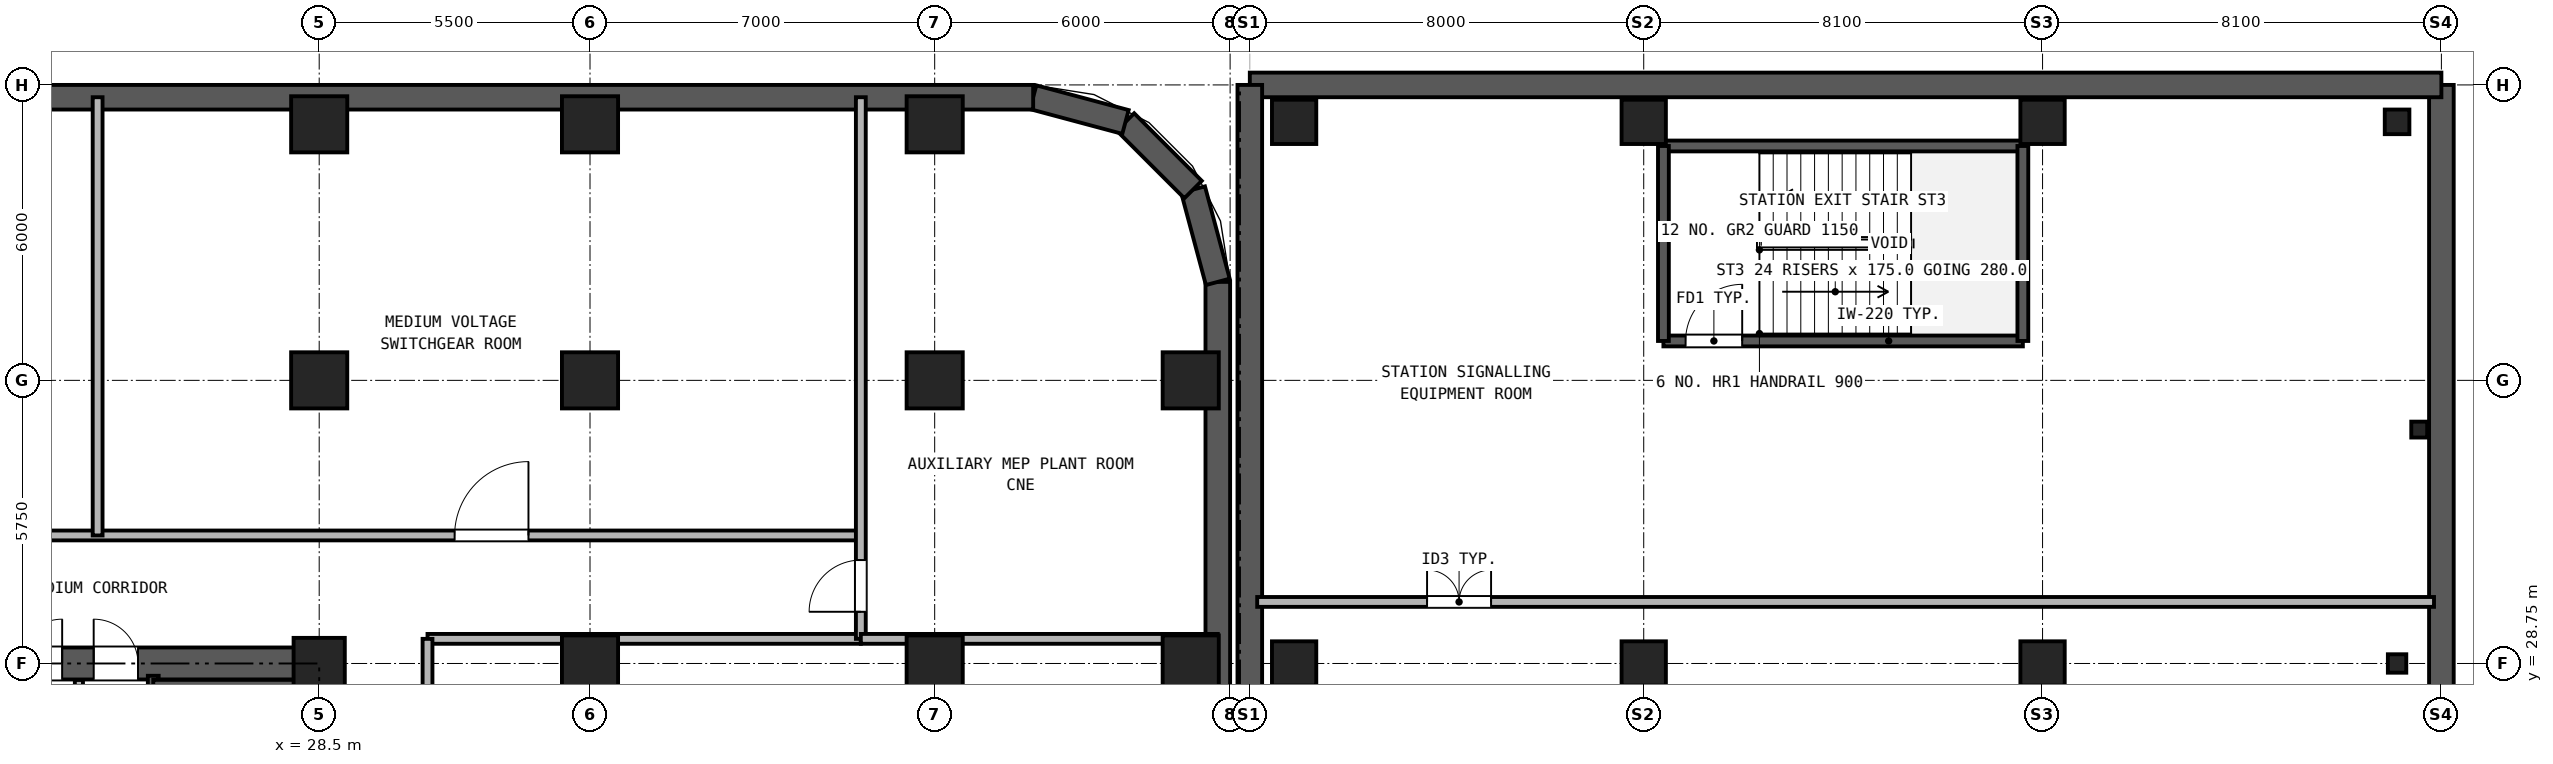
"""IFC4 building model, lengths in metres.
Left out: names, types, materials, properties, quantities, classifications, styles, units other than length and angle.
Written with IfcOpenShell. Run it as: python <this file> out.ifc"""

import sys

from ifc_helpers import new_model, si_unit, direction, frame, frame_2d, origin, origin_2d, place, context, subcontext, project, spatial, rectangle, hollow_rectangle, i_section, extrude, source, transform, mapped, element, fill, save


model = new_model("IFC4")
c1 = context("Model", 3, precision=1e-05, world=origin(), true_north=direction((0.0, 1.0)))
c2 = subcontext(c1, "Body", "Model", "MODEL_VIEW")
j1 = project(units=[si_unit("LENGTHUNIT", "METRE"), si_unit("PLANEANGLEUNIT", "RADIAN")], contexts=[c1])
p1 = place(None, origin())
s1 = spatial("IfcSite", under=j1, at=p1, CompositionType="ELEMENT")
p2 = place(p1, origin())
s2 = spatial("IfcBuilding", under=s1, at=p2, CompositionType="ELEMENT")
p3 = place(p2, frame((0.0, 0.0, -4.2)))
s3 = spatial("IfcBuildingStorey", under=s2, at=p3, CompositionType="ELEMENT", Elevation=-4.2)
m1 = source(origin(), c2, "Body", "SweptSolid", [
    extrude(hollow_rectangle(XDim=1.14, YDim=1.14, WallThickness=0.07, at=origin_2d()), origin(), (0.0, 0.0, 1.0), 3.88),
])
for number, where, z_axis, x_axis in (
    (1, (28.5, 39.7, 0.0), (0.0, 0.0, 1.0), (1.0, 0.0, 0.0)),
    (2, (34.0, 39.7, 0.0), (0.0, 0.0, 1.0), (1.0, 0.0, 0.0)),
    (3, (41.0, 39.7, 0.0), (0.0, 0.0, 1.0), (1.0, 0.0, 0.0)),
    (4, (46.2, 28.75, 0.0), (0.0, 0.0, 1.0), (1.0, 0.0, 0.0)),
    (5, (46.2, 34.5, 0.0), (0.0, 0.0, 1.0), (1.0, 0.0, 0.0)),
):
    element("IfcColumn", number, at=place(p3, frame(where, z_axis=z_axis, x_axis=x_axis)), inside=s3, PredefinedType="COLUMN", context=c2, shape_type="MappedRepresentation", body=[
        mapped(m1, transform((0.0, 0.0, 0.0), x_axis=(1.0, 0.0, 0.0), y_axis=(0.0, 1.0, 0.0), z_axis=(0.0, 0.0, 1.0), scale=1.0)),
    ])
m2 = source(origin(), c2, "Body", "SweptSolid", [
    extrude(hollow_rectangle(XDim=1.04, YDim=1.04, WallThickness=0.065, at=origin_2d()), origin(), (0.0, 0.0, 1.0), 3.88),
])
p4 = place(p3, frame((28.5, 28.75, 0.0), z_axis=(0.0, 0.0, 1.0), x_axis=(1.0, 0.0, 0.0)))
e6 = element("IfcColumn", 6, at=p4, inside=s3, PredefinedType="COLUMN", context=c2, shape_type="MappedRepresentation", body=[
    mapped(m2, transform((0.0, 0.0, 0.0), x_axis=(1.0, 0.0, 0.0), y_axis=(0.0, 1.0, 0.0), z_axis=(0.0, 0.0, 1.0), scale=1.0)),
])
for number, where, z_axis, x_axis in (
    (7, (28.5, 34.5, 0.0), (0.0, 0.0, 1.0), (1.0, 0.0, 0.0)),
    (8, (34.0, 28.75, 0.0), (0.0, 0.0, 1.0), (1.0, 0.0, 0.0)),
    (9, (34.0, 34.5, 0.0), (0.0, 0.0, 1.0), (1.0, 0.0, 0.0)),
    (10, (41.0, 28.75, 0.0), (0.0, 0.0, 1.0), (1.0, 0.0, 0.0)),
    (11, (41.0, 34.5, 0.0), (0.0, 0.0, 1.0), (1.0, 0.0, 0.0)),
):
    element("IfcColumn", number, at=place(p3, frame(where, z_axis=z_axis, x_axis=x_axis)), inside=s3, PredefinedType="COLUMN", context=c2, shape_type="MappedRepresentation", body=[
        mapped(m1, transform((0.0, 0.0, 0.0), x_axis=(1.0, 0.0, 0.0), y_axis=(0.0, 1.0, 0.0), z_axis=(0.0, 0.0, 1.0), scale=1.0)),
    ])
m3 = source(origin(), c2, "Body", "SweptSolid", [
    extrude(hollow_rectangle(XDim=0.7, YDim=0.9, WallThickness=0.04, at=origin_2d()), origin(), (0.0, 0.0, 1.0), 3.88),
])
for number, where, z_axis, x_axis in (
    (12, (48.3, 28.75, 0.0), (0.0, 0.0, 1.0), (1.0, 0.0, 0.0)),
    (13, (48.3, 39.75, 0.0), (0.0, 0.0, 1.0), (1.0, 0.0, 0.0)),
    (14, (55.4, 28.75, 0.0), (0.0, 0.0, 1.0), (1.0, 0.0, 0.0)),
    (15, (55.4, 39.75, 0.0), (0.0, 0.0, 1.0), (1.0, 0.0, 0.0)),
    (16, (63.5, 28.75, 0.0), (0.0, 0.0, 1.0), (1.0, 0.0, 0.0)),
    (17, (63.5, 39.75, 0.0), (0.0, 0.0, 1.0), (1.0, 0.0, 0.0)),
):
    element("IfcColumn", number, at=place(p3, frame(where, z_axis=z_axis, x_axis=x_axis)), inside=s3, PredefinedType="COLUMN", context=c2, shape_type="MappedRepresentation", body=[
        mapped(m3, transform((0.0, 0.0, 0.0), x_axis=(1.0, 0.0, 0.0), y_axis=(0.0, 1.0, 0.0), z_axis=(0.0, 0.0, 1.0), scale=1.0)),
    ])
m4 = source(origin(), c2, "Body", "SweptSolid", [
    extrude(i_section(OverallWidth=0.374, OverallDepth=0.372, WebThickness=0.016, FlangeThickness=0.026, at=origin_2d()), origin(), (0.0, 0.0, 1.0), 3.88),
])
p5 = place(p3, frame((70.7, 28.75, 0.0), z_axis=(0.0, 0.0, 1.0), x_axis=(1.0, 0.0, 0.0)))
e18 = element("IfcColumn", 18, at=p5, inside=s3, PredefinedType="COLUMN", context=c2, shape_type="MappedRepresentation", body=[
    mapped(m4, transform((0.0, 0.0, 0.0), x_axis=(1.0, 0.0, 0.0), y_axis=(0.0, 1.0, 0.0), z_axis=(0.0, 0.0, 1.0), scale=1.0)),
])
m5 = source(origin(), c2, "Body", "SweptSolid", [
    extrude(hollow_rectangle(XDim=0.5, YDim=0.5, WallThickness=0.025, at=origin_2d()), origin(), (0.0, 0.0, 1.0), 3.88),
])
p6 = place(p3, frame((70.7, 39.75, 0.0), z_axis=(0.0, 0.0, 1.0), x_axis=(1.0, 0.0, 0.0)))
e19 = element("IfcColumn", 19, at=p6, inside=s3, PredefinedType="COLUMN", context=c2, shape_type="MappedRepresentation", body=[
    mapped(m5, transform((0.0, 0.0, 0.0), x_axis=(1.0, 0.0, 0.0), y_axis=(0.0, 1.0, 0.0), z_axis=(0.0, 0.0, 1.0), scale=1.0)),
])
m6 = source(origin(), c2, "Body", "SweptSolid", [
    extrude(i_section(OverallWidth=0.309, OverallDepth=0.323, WebThickness=0.014, FlangeThickness=0.023, at=origin_2d()), origin(), (0.0, 0.0, 1.0), 3.88),
])
p7 = place(p3, frame((71.15, 33.5, 0.0), z_axis=(0.0, 0.0, 1.0), x_axis=(1.0, 0.0, 0.0)))
e20 = element("IfcColumn", 20, at=p7, inside=s3, PredefinedType="PILASTER", context=c2, shape_type="MappedRepresentation", body=[
    mapped(m6, transform((0.0, 0.0, 0.0), x_axis=(1.0, 0.0, 0.0), y_axis=(0.0, 1.0, 0.0), z_axis=(0.0, 0.0, 1.0), scale=1.0)),
])
p8 = place(p3, frame((46.75, 4.0, 0.0), z_axis=(0.0, 0.0, 1.0), x_axis=(0.0, 1.0, 0.0)))
e21 = element("IfcWall", 21, at=p8, inside=s3, PredefinedType="USERDEFINED", context=c2, shape_type="SweptSolid", body=[
    extrude(rectangle(XDim=32.5, YDim=0.5, at=frame_2d((16.25, 0.0))), origin(), (0.0, 0.0, 1.0), 3.88),
])
for number, where, z_axis, x_axis in (
    (22, (46.75, 36.5, 0.0), (0.0, 0.0, 1.0), (-0.259, 0.966, 0.0)),
    (23, (46.248, 38.375, 0.0), (0.0, 0.0, 1.0), (-0.707, 0.707, 0.0)),
    (24, (44.875, 39.748, 0.0), (0.0, 0.0, 1.0), (-0.966, 0.259, 0.0)),
):
    element("IfcWall", number, at=place(p3, frame(where, z_axis=z_axis, x_axis=x_axis)), inside=s3, PredefinedType="USERDEFINED", context=c2, shape_type="SweptSolid", body=[
        extrude(rectangle(XDim=1.941, YDim=0.5, at=frame_2d((0.971, 0.0))), origin(), (0.0, 0.0, 1.0), 3.88),
    ])
p9 = place(p3, frame((43.0, 40.25, 0.0), z_axis=(0.0, 0.0, 1.0), x_axis=(-1.0, 0.0, 0.0)))
e25 = element("IfcWall", 25, at=p9, inside=s3, PredefinedType="USERDEFINED", context=c2, shape_type="SweptSolid", body=[
    extrude(rectangle(XDim=39.0, YDim=0.5, at=frame_2d((19.5, 0.0))), origin(), (0.0, 0.0, 1.0), 3.88),
])
p10 = place(p3, frame((71.6, -11.1, 0.0), z_axis=(0.0, 0.0, 1.0), x_axis=(0.0, 1.0, 0.0)))
e26 = element("IfcWall", 26, at=p10, inside=s3, PredefinedType="USERDEFINED", context=c2, shape_type="SweptSolid", body=[
    extrude(rectangle(XDim=51.6, YDim=0.5, at=frame_2d((25.8, 0.0))), origin(), (0.0, 0.0, 1.0), 3.88),
])
p11 = place(p3, frame((71.6, 40.5, 0.0), z_axis=(0.0, 0.0, 1.0), x_axis=(-1.0, 0.0, 0.0)))
e27 = element("IfcWall", 27, at=p11, inside=s3, PredefinedType="USERDEFINED", context=c2, shape_type="SweptSolid", body=[
    extrude(rectangle(XDim=24.2, YDim=0.5, at=frame_2d((12.1, 0.0))), origin(), (0.0, 0.0, 1.0), 3.88),
])
p12 = place(p3, frame((47.4, 40.5, 0.0), z_axis=(0.0, 0.0, 1.0), x_axis=(0.0, -1.0, 0.0)))
e28 = element("IfcWall", 28, at=p12, inside=s3, PredefinedType="USERDEFINED", context=c2, shape_type="SweptSolid", body=[
    extrude(rectangle(XDim=40.9, YDim=0.5, at=frame_2d((20.45, 0.0))), origin(), (0.0, 0.0, 1.0), 3.88),
])
p13 = place(p3, frame((18.175, 28.75, 0.0), z_axis=(0.0, 0.0, 1.0), x_axis=(1.0, 0.0, 0.0)))
e29 = element("IfcWall", 29, at=p13, inside=s3, PredefinedType="SHEAR", context=c2, shape_type="SweptSolid", body=[
    extrude(rectangle(XDim=10.65, YDim=0.65, at=frame_2d((5.325, 0.0))), origin(), (0.0, 0.0, 1.0), 3.88),
])
p14 = place(p13, frame((4.205, 0.0, 0.0)))
e30 = element("IfcOpeningElement", 30, at=p14, cuts=e29, PredefinedType="OPENING", context=c2, shape_type="SweptSolid", body=[
    extrude(rectangle(XDim=0.9, YDim=2.05, at=frame_2d((0.45, 1.025))), frame((0.0, 0.335, 0.0), z_axis=(0.0, -1.0, 0.0), x_axis=(1.0, 0.0, 0.0)), (0.0, 0.0, 1.0), 0.67),
])
p15 = place(p13, frame((5.745, 0.0, 0.0)))
e31 = element("IfcOpeningElement", 31, at=p15, cuts=e29, PredefinedType="OPENING", context=c2, shape_type="SweptSolid", body=[
    extrude(rectangle(XDim=0.9, YDim=2.05, at=frame_2d((0.45, 1.025))), frame((0.0, 0.335, 0.0), z_axis=(0.0, -1.0, 0.0), x_axis=(1.0, 0.0, 0.0)), (0.0, 0.0, 1.0), 0.67),
])
p16 = place(p3, frame((28.5, 11.825, 0.0), z_axis=(0.0, 0.0, 1.0), x_axis=(0.0, 1.0, 0.0)))
e32 = element("IfcWall", 32, at=p16, inside=s3, PredefinedType="SHEAR", context=c2, shape_type="SweptSolid", body=[
    extrude(rectangle(XDim=16.6, YDim=0.65, at=frame_2d((8.3, 0.0))), origin(), (0.0, 0.0, 1.0), 3.88),
])
p17 = place(p16, frame((7.325, 0.0, 0.0)))
e33 = element("IfcOpeningElement", 33, at=p17, cuts=e32, PredefinedType="OPENING", context=c2, shape_type="SweptSolid", body=[
    extrude(rectangle(XDim=1.15, YDim=2.2, at=frame_2d((0.575, 1.1))), frame((0.0, 0.335, 0.0), z_axis=(0.0, -1.0, 0.0), x_axis=(1.0, 0.0, 0.0)), (0.0, 0.0, 1.0), 0.67),
])
p18 = place(p3, frame((25.13, 21.39, 0.0), z_axis=(0.0, 0.0, 1.0), x_axis=(0.0, 1.0, 0.0)))
e34 = element("IfcWall", 34, at=p18, inside=s3, PredefinedType="SOLIDWALL", context=c2, shape_type="SweptSolid", body=[
    extrude(rectangle(XDim=7.11, YDim=0.22, at=frame_2d((3.555, 0.0))), origin(), (0.0, 0.0, 1.0), 3.88),
])
p19 = place(p3, frame((25.13, 28.335, 0.0), z_axis=(0.0, 0.0, 1.0), x_axis=(1.0, 0.0, 0.0)))
e35 = element("IfcWall", 35, at=p19, inside=s3, PredefinedType="PARTITIONING", context=c2, shape_type="SweptSolid", body=[
    extrude(rectangle(XDim=3.035, YDim=0.165, at=frame_2d((1.518, 0.0))), origin(), (0.0, 0.0, 1.0), 3.88),
])
p20 = place(p3, frame((23.62, 24.4, 0.0), z_axis=(0.0, 0.0, 1.0), x_axis=(0.0, 1.0, 0.0)))
e36 = element("IfcWall", 36, at=p20, inside=s3, PredefinedType="PARTITIONING", context=c2, shape_type="SweptSolid", body=[
    extrude(rectangle(XDim=4.015, YDim=0.165, at=frame_2d((2.008, 0.0))), origin(), (0.0, 0.0, 1.0), 3.88),
])
p21 = place(p3, frame((7.5, 31.35, 0.0), z_axis=(0.0, 0.0, 1.0), x_axis=(1.0, 0.0, 0.0)))
e37 = element("IfcWall", 37, at=p21, inside=s3, PredefinedType="PARTITIONING", context=c2, shape_type="SweptSolid", body=[
    extrude(rectangle(XDim=32.0, YDim=0.2, at=frame_2d((16.0, 0.0))), origin(), (0.0, 0.0, 1.0), 3.88),
])
p22 = place(p21, frame((7.75, 0.0, 0.0)))
e38 = element("IfcOpeningElement", 38, at=p22, cuts=e37, PredefinedType="OPENING", context=c2, shape_type="SweptSolid", body=[
    extrude(rectangle(XDim=1.5, YDim=2.25, at=frame_2d((0.75, 1.125))), frame((0.0, 0.11, 0.0), z_axis=(0.0, -1.0, 0.0), x_axis=(1.0, 0.0, 0.0)), (0.0, 0.0, 1.0), 0.22),
])
p23 = place(p21, frame((23.75, 0.0, 0.0)))
e39 = element("IfcOpeningElement", 39, at=p23, cuts=e37, PredefinedType="OPENING", context=c2, shape_type="SweptSolid", body=[
    extrude(rectangle(XDim=1.5, YDim=2.25, at=frame_2d((0.75, 1.125))), frame((0.0, 0.11, 0.0), z_axis=(0.0, -1.0, 0.0), x_axis=(1.0, 0.0, 0.0)), (0.0, 0.0, 1.0), 0.22),
])
p24 = place(p3, frame((30.7, 29.25, 0.0), z_axis=(0.0, 0.0, 1.0), x_axis=(1.0, 0.0, 0.0)))
e40 = element("IfcWall", 40, at=p24, inside=s3, PredefinedType="PARTITIONING", context=c2, shape_type="SweptSolid", body=[
    extrude(rectangle(XDim=8.8, YDim=0.2, at=frame_2d((4.4, 0.0))), origin(), (0.0, 0.0, 1.0), 3.88),
])
p25 = place(p3, frame((30.7, 11.0, 0.0), z_axis=(0.0, 0.0, 1.0), x_axis=(0.0, 1.0, 0.0)))
e41 = element("IfcWall", 41, at=p25, inside=s3, PredefinedType="PARTITIONING", context=c2, shape_type="SweptSolid", body=[
    extrude(rectangle(XDim=18.25, YDim=0.2, at=frame_2d((9.125, 0.0))), origin(), (0.0, 0.0, 1.0), 3.88),
])
p26 = place(p25, frame((8.625, 0.0, 0.0)))
e42 = element("IfcOpeningElement", 42, at=p26, cuts=e41, PredefinedType="OPENING", context=c2, shape_type="SweptSolid", body=[
    extrude(rectangle(XDim=0.95, YDim=2.15, at=frame_2d((0.475, 1.075))), frame((0.0, 0.11, 0.0), z_axis=(0.0, -1.0, 0.0), x_axis=(1.0, 0.0, 0.0)), (0.0, 0.0, 1.0), 0.22),
])
p27 = place(p3, frame((39.5, 29.25, 0.0), z_axis=(0.0, 0.0, 1.0), x_axis=(0.0, 1.0, 0.0)))
e43 = element("IfcWall", 43, at=p27, inside=s3, PredefinedType="PARTITIONING", context=c2, shape_type="SweptSolid", body=[
    extrude(rectangle(XDim=11.0, YDim=0.2, at=frame_2d((5.5, 0.0))), origin(), (0.0, 0.0, 1.0), 3.88),
])
p28 = place(p27, frame((0.55, 0.0, 0.0)))
e44 = element("IfcOpeningElement", 44, at=p28, cuts=e43, PredefinedType="OPENING", context=c2, shape_type="SweptSolid", body=[
    extrude(rectangle(XDim=1.05, YDim=2.15, at=frame_2d((0.525, 1.075))), frame((0.0, 0.11, 0.0), z_axis=(0.0, -1.0, 0.0), x_axis=(1.0, 0.0, 0.0)), (0.0, 0.0, 1.0), 0.22),
])
p29 = place(p3, frame((39.5, 29.25, 0.0), z_axis=(0.0, 0.0, 1.0), x_axis=(1.0, 0.0, 0.0)))
e45 = element("IfcWall", 45, at=p29, inside=s3, PredefinedType="PARTITIONING", context=c2, shape_type="SweptSolid", body=[
    extrude(rectangle(XDim=7.25, YDim=0.2, at=frame_2d((3.625, 0.0))), origin(), (0.0, 0.0, 1.0), 3.88),
])
p30 = place(p3, frame((24.0, 31.35, 0.0), z_axis=(0.0, 0.0, 1.0), x_axis=(0.0, 1.0, 0.0)))
e46 = element("IfcWall", 46, at=p30, inside=s3, PredefinedType="PARTITIONING", context=c2, shape_type="SweptSolid", body=[
    extrude(rectangle(XDim=8.9, YDim=0.2, at=frame_2d((4.45, 0.0))), origin(), (0.0, 0.0, 1.0), 3.88),
])
p31 = place(p3, frame((55.8, 35.3, 0.0), z_axis=(0.0, 0.0, 1.0), x_axis=(1.0, 0.0, 0.0)))
e47 = element("IfcWall", 47, at=p31, inside=s3, PredefinedType="SOLIDWALL", context=c2, shape_type="SweptSolid", body=[
    extrude(rectangle(XDim=7.3, YDim=0.22, at=frame_2d((3.65, 0.0))), origin(), (0.0, 0.0, 1.0), 3.88),
])
p32 = place(p31, frame((0.45, 0.0, 0.0)))
e48 = element("IfcOpeningElement", 48, at=p32, cuts=e47, PredefinedType="OPENING", context=c2, shape_type="SweptSolid", body=[
    extrude(rectangle(XDim=1.15, YDim=2.2, at=frame_2d((0.575, 1.1))), frame((0.0, 0.12, 0.0), z_axis=(0.0, -1.0, 0.0), x_axis=(1.0, 0.0, 0.0)), (0.0, 0.0, 1.0), 0.24),
])
p33 = place(p3, frame((55.8, 39.26, 0.0), z_axis=(0.0, 0.0, 1.0), x_axis=(1.0, 0.0, 0.0)))
e49 = element("IfcWall", 49, at=p33, inside=s3, PredefinedType="SOLIDWALL", context=c2, shape_type="SweptSolid", body=[
    extrude(rectangle(XDim=7.3, YDim=0.22, at=frame_2d((3.65, 0.0))), origin(), (0.0, 0.0, 1.0), 3.88),
])
for number, where, z_axis, x_axis in (
    (50, (55.8, 35.3, 0.0), (0.0, 0.0, 1.0), (0.0, 1.0, 0.0)),
    (51, (63.1, 35.3, 0.0), (0.0, 0.0, 1.0), (0.0, 1.0, 0.0)),
):
    element("IfcWall", number, at=place(p3, frame(where, z_axis=z_axis, x_axis=x_axis)), inside=s3, PredefinedType="SOLIDWALL", context=c2, shape_type="SweptSolid", body=[
        extrude(rectangle(XDim=3.96, YDim=0.22, at=frame_2d((1.98, 0.0))), origin(), (0.0, 0.0, 1.0), 3.88),
    ])
p34 = place(p3, frame((47.55, 30.0, 0.0), z_axis=(0.0, 0.0, 1.0), x_axis=(1.0, 0.0, 0.0)))
e52 = element("IfcWall", 52, at=p34, inside=s3, PredefinedType="PARTITIONING", context=c2, shape_type="SweptSolid", body=[
    extrude(rectangle(XDim=23.9, YDim=0.2, at=frame_2d((11.95, 0.0))), origin(), (0.0, 0.0, 1.0), 3.88),
])
p35 = place(p34, frame((3.45, 0.0, 0.0)))
e53 = element("IfcOpeningElement", 53, at=p35, cuts=e52, PredefinedType="OPENING", context=c2, shape_type="SweptSolid", body=[
    extrude(rectangle(XDim=1.3, YDim=2.2, at=frame_2d((0.65, 1.1))), frame((0.0, 0.11, 0.0), z_axis=(0.0, -1.0, 0.0), x_axis=(1.0, 0.0, 0.0)), (0.0, 0.0, 1.0), 0.22),
])
p36 = place(p14, origin())
e54 = element("IfcDoor", 54, at=p36, inside=s3, OperationType="SINGLE_SWING_RIGHT", PredefinedType="DOOR", context=c2, shape_type="SweptSolid", body=[
    extrude(rectangle(XDim=0.9, YDim=2.05, at=frame_2d((0.45, 1.025))), frame((0.0, 0.025, 0.0), z_axis=(0.0, -1.0, 0.0), x_axis=(1.0, 0.0, 0.0)), (0.0, 0.0, 1.0), 0.05),
])
fill(e30, e54)
p37 = place(p15, origin())
e55 = element("IfcDoor", 55, at=p37, inside=s3, OperationType="SINGLE_SWING_LEFT", PredefinedType="DOOR", context=c2, shape_type="SweptSolid", body=[
    extrude(rectangle(XDim=0.9, YDim=2.05, at=frame_2d((0.45, 1.025))), frame((0.0, 0.025, 0.0), z_axis=(0.0, -1.0, 0.0), x_axis=(1.0, 0.0, 0.0)), (0.0, 0.0, 1.0), 0.05),
])
fill(e31, e55)
p38 = place(p23, origin())
e56 = element("IfcDoor", 56, at=p38, inside=s3, OperationType="SINGLE_SWING_RIGHT", PredefinedType="DOOR", context=c2, shape_type="SweptSolid", body=[
    extrude(rectangle(XDim=1.5, YDim=2.25, at=frame_2d((0.75, 1.125))), frame((0.0, 0.025, 0.0), z_axis=(0.0, -1.0, 0.0), x_axis=(1.0, 0.0, 0.0)), (0.0, 0.0, 1.0), 0.05),
])
fill(e39, e56)
p39 = place(p28, origin())
e57 = element("IfcDoor", 57, at=p39, inside=s3, OperationType="SINGLE_SWING_LEFT", PredefinedType="DOOR", context=c2, shape_type="SweptSolid", body=[
    extrude(rectangle(XDim=1.05, YDim=2.15, at=frame_2d((0.525, 1.075))), frame((0.0, 0.025, 0.0), z_axis=(0.0, -1.0, 0.0), x_axis=(1.0, 0.0, 0.0)), (0.0, 0.0, 1.0), 0.05),
])
fill(e44, e57)
p40 = place(p32, frame((1.15, 0.0, 0.0), z_axis=(0.0, 0.0, 1.0), x_axis=(-1.0, 0.0, 0.0)))
e58 = element("IfcDoor", 58, at=p40, inside=s3, OperationType="SINGLE_SWING_RIGHT", PredefinedType="DOOR", context=c2, shape_type="SweptSolid", body=[
    extrude(rectangle(XDim=1.15, YDim=2.2, at=frame_2d((0.575, 1.1))), frame((0.0, 0.025, 0.0), z_axis=(0.0, -1.0, 0.0), x_axis=(1.0, 0.0, 0.0)), (0.0, 0.0, 1.0), 0.05),
])
fill(e48, e58)
p41 = place(p35, origin())
e59 = element("IfcDoor", 59, at=p41, inside=s3, OperationType="DOUBLE_DOOR_SINGLE_SWING", PredefinedType="DOOR", context=c2, shape_type="SweptSolid", body=[
    extrude(rectangle(XDim=1.3, YDim=2.2, at=frame_2d((0.65, 1.1))), frame((0.0, 0.025, 0.0), z_axis=(0.0, -1.0, 0.0), x_axis=(1.0, 0.0, 0.0)), (0.0, 0.0, 1.0), 0.05),
])
fill(e53, e59)
save(model, sys.argv[1])
